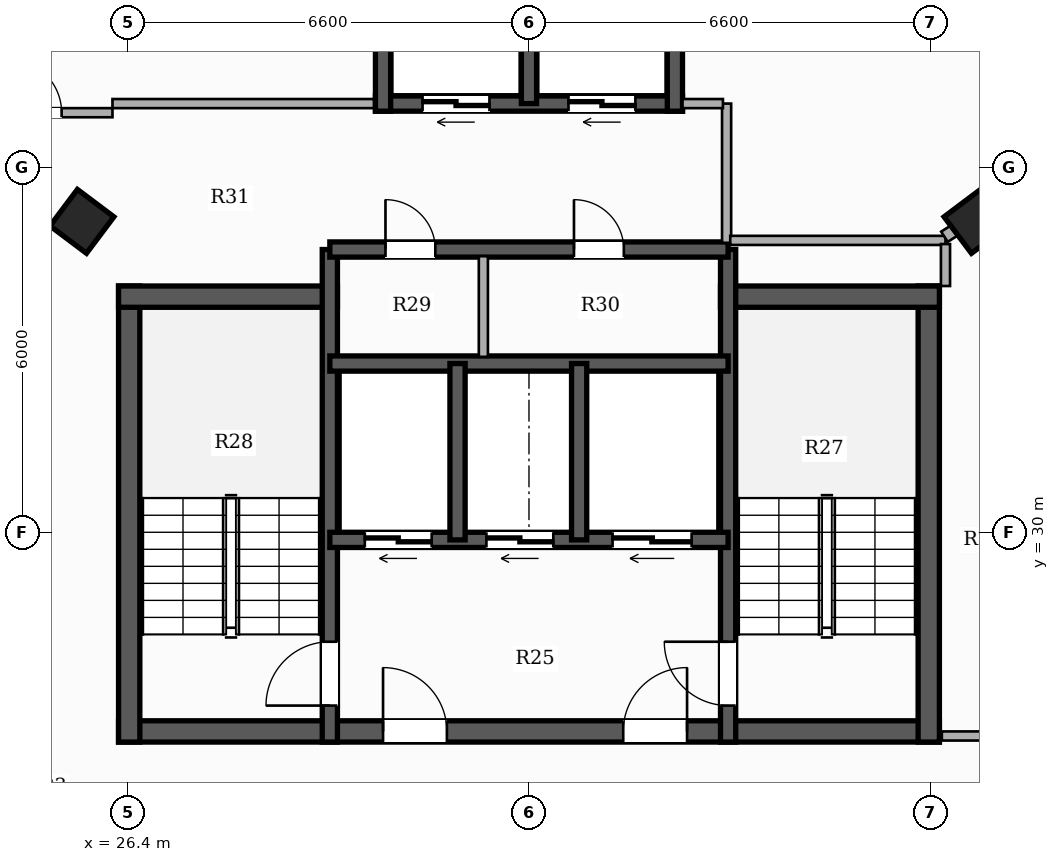
"""IFC4 building model, lengths in metres.
Left out: names, types, materials, properties, quantities, classifications, styles, units other than length and angle.
Written with IfcOpenShell. Run it as: python <this file> out.ifc"""

import sys

from ifc_helpers import new_model, si_unit, direction, frame, frame_2d, origin, origin_2d, place, context, subcontext, project, spatial, rectangle, hollow_rectangle, extrude, element, fill, save


model = new_model("IFC4")
c1 = context("Model", 3, precision=1e-05, world=origin(), true_north=direction((0.0, 1.0)))
c2 = subcontext(c1, "Body", "Model", "MODEL_VIEW")
j1 = project(units=[si_unit("LENGTHUNIT", "METRE"), si_unit("PLANEANGLEUNIT", "RADIAN")], contexts=[c1])
p1 = place(None, origin())
s1 = spatial("IfcSite", under=j1, at=p1, CompositionType="ELEMENT")
p2 = place(p1, origin())
s2 = spatial("IfcBuilding", under=s1, at=p2, CompositionType="ELEMENT")
p3 = place(p2, frame((0.0, 0.0, 206.3)))
s3 = spatial("IfcBuildingStorey", under=s2, at=p3, CompositionType="ELEMENT", Elevation=206.3)
p4 = place(p3, frame((26.25, 26.725, 0.0), z_axis=(0.0, 0.0, 1.0), x_axis=(1.0, 0.0, 0.0)))
e1 = element("IfcWall", 1, at=p4, inside=s3, PredefinedType="SHEAR", context=c2, shape_type="SweptSolid", body=[
    extrude(rectangle(XDim=13.5, YDim=0.35, at=frame_2d((6.75, 0.0))), origin(), (0.0, 0.0, 1.0), 3.3),
])
p5 = place(p4, frame((4.35, 0.0, 0.0)))
e2 = element("IfcOpeningElement", 2, at=p5, cuts=e1, PredefinedType="OPENING", context=c2, shape_type="SweptSolid", body=[
    extrude(rectangle(XDim=1.05, YDim=2.15, at=frame_2d((0.525, 1.075))), frame((0.0, 0.185, 0.0), z_axis=(0.0, -1.0, 0.0), x_axis=(1.0, 0.0, 0.0)), (0.0, 0.0, 1.0), 0.37),
])
p6 = place(p4, frame((8.3, 0.0, 0.0)))
e3 = element("IfcOpeningElement", 3, at=p6, cuts=e1, PredefinedType="OPENING", context=c2, shape_type="SweptSolid", body=[
    extrude(rectangle(XDim=1.05, YDim=2.15, at=frame_2d((0.525, 1.075))), frame((0.0, 0.185, 0.0), z_axis=(0.0, -1.0, 0.0), x_axis=(1.0, 0.0, 0.0)), (0.0, 0.0, 1.0), 0.37),
])
p7 = place(p3, frame((26.425, 26.55, 0.0), z_axis=(0.0, 0.0, 1.0), x_axis=(0.0, 1.0, 0.0)))
e4 = element("IfcWall", 4, at=p7, inside=s3, PredefinedType="SHEAR", context=c2, shape_type="SweptSolid", body=[
    extrude(rectangle(XDim=7.5, YDim=0.35, at=frame_2d((3.75, 0.0))), origin(), (0.0, 0.0, 1.0), 3.3),
])
p8 = place(p3, frame((26.25, 33.875, 0.0), z_axis=(0.0, 0.0, 1.0), x_axis=(1.0, 0.0, 0.0)))
e5 = element("IfcWall", 5, at=p8, inside=s3, PredefinedType="SHEAR", context=c2, shape_type="SweptSolid", body=[
    extrude(rectangle(XDim=3.6, YDim=0.35, at=frame_2d((1.8, 0.0))), origin(), (0.0, 0.0, 1.0), 3.3),
])
p9 = place(p3, frame((39.575, 26.55, 0.0), z_axis=(0.0, 0.0, 1.0), x_axis=(0.0, 1.0, 0.0)))
e6 = element("IfcWall", 6, at=p9, inside=s3, PredefinedType="SHEAR", context=c2, shape_type="SweptSolid", body=[
    extrude(rectangle(XDim=7.5, YDim=0.35, at=frame_2d((3.75, 0.0))), origin(), (0.0, 0.0, 1.0), 3.3),
])
p10 = place(p3, frame((36.15, 33.875, 0.0), z_axis=(0.0, 0.0, 1.0), x_axis=(1.0, 0.0, 0.0)))
e7 = element("IfcWall", 7, at=p10, inside=s3, PredefinedType="SHEAR", context=c2, shape_type="SweptSolid", body=[
    extrude(rectangle(XDim=3.6, YDim=0.35, at=frame_2d((1.8, 0.0))), origin(), (0.0, 0.0, 1.0), 3.3),
])
p11 = place(p3, frame((29.725, 26.55, 0.0), z_axis=(0.0, 0.0, 1.0), x_axis=(0.0, 1.0, 0.0)))
e8 = element("IfcWall", 8, at=p11, inside=s3, PredefinedType="SHEAR", context=c2, shape_type="SweptSolid", body=[
    extrude(rectangle(XDim=8.1, YDim=0.25, at=frame_2d((4.05, 0.0))), origin(), (0.0, 0.0, 1.0), 3.3),
])
p12 = place(p11, frame((0.6, 0.0, 0.0)))
e9 = element("IfcOpeningElement", 9, at=p12, cuts=e8, PredefinedType="OPENING", context=c2, shape_type="SweptSolid", body=[
    extrude(rectangle(XDim=1.05, YDim=2.15, at=frame_2d((0.525, 1.075))), frame((0.0, 0.135, 0.0), z_axis=(0.0, -1.0, 0.0), x_axis=(1.0, 0.0, 0.0)), (0.0, 0.0, 1.0), 0.27),
])
p13 = place(p3, frame((36.275, 26.55, 0.0), z_axis=(0.0, 0.0, 1.0), x_axis=(0.0, 1.0, 0.0)))
e10 = element("IfcWall", 10, at=p13, inside=s3, PredefinedType="SHEAR", context=c2, shape_type="SweptSolid", body=[
    extrude(rectangle(XDim=8.1, YDim=0.25, at=frame_2d((4.05, 0.0))), origin(), (0.0, 0.0, 1.0), 3.3),
])
p14 = place(p13, frame((0.6, 0.0, 0.0)))
e11 = element("IfcOpeningElement", 11, at=p14, cuts=e10, PredefinedType="OPENING", context=c2, shape_type="SweptSolid", body=[
    extrude(rectangle(XDim=1.05, YDim=2.15, at=frame_2d((0.525, 1.075))), frame((0.0, 0.135, 0.0), z_axis=(0.0, -1.0, 0.0), x_axis=(1.0, 0.0, 0.0)), (0.0, 0.0, 1.0), 0.27),
])
p15 = place(p3, frame((36.275, 29.875, 0.0), z_axis=(0.0, 0.0, 1.0), x_axis=(-1.0, 0.0, 0.0)))
e12 = element("IfcWall", 12, at=p15, inside=s3, PredefinedType="SHEAR", context=c2, shape_type="SweptSolid", body=[
    extrude(rectangle(XDim=6.55, YDim=0.25, at=frame_2d((3.275, 0.0))), origin(), (0.0, 0.0, 1.0), 3.3),
])
p16 = place(p15, frame((4.875, 0.0, 0.0)))
e13 = element("IfcOpeningElement", 13, at=p16, cuts=e12, PredefinedType="OPENING", context=c2, shape_type="SweptSolid", body=[
    extrude(rectangle(XDim=1.1, YDim=2.2, at=frame_2d((0.55, 1.1))), frame((0.0, 0.135, 0.0), z_axis=(0.0, -1.0, 0.0), x_axis=(1.0, 0.0, 0.0)), (0.0, 0.0, 1.0), 0.27),
])
p17 = place(p15, frame((2.875, 0.0, 0.0)))
e14 = element("IfcOpeningElement", 14, at=p17, cuts=e12, PredefinedType="OPENING", context=c2, shape_type="SweptSolid", body=[
    extrude(rectangle(XDim=1.1, YDim=2.2, at=frame_2d((0.55, 1.1))), frame((0.0, 0.135, 0.0), z_axis=(0.0, -1.0, 0.0), x_axis=(1.0, 0.0, 0.0)), (0.0, 0.0, 1.0), 0.27),
])
p18 = place(p15, frame((0.6, 0.0, 0.0)))
e15 = element("IfcOpeningElement", 15, at=p18, cuts=e12, PredefinedType="OPENING", context=c2, shape_type="SweptSolid", body=[
    extrude(rectangle(XDim=1.3, YDim=2.2, at=frame_2d((0.65, 1.1))), frame((0.0, 0.135, 0.0), z_axis=(0.0, -1.0, 0.0), x_axis=(1.0, 0.0, 0.0)), (0.0, 0.0, 1.0), 0.27),
])
p19 = place(p3, frame((29.725, 32.775, 0.0), z_axis=(0.0, 0.0, 1.0), x_axis=(1.0, 0.0, 0.0)))
e16 = element("IfcWall", 16, at=p19, inside=s3, PredefinedType="SHEAR", context=c2, shape_type="SweptSolid", body=[
    extrude(rectangle(XDim=6.55, YDim=0.25, at=frame_2d((3.275, 0.0))), origin(), (0.0, 0.0, 1.0), 3.3),
])
for number, where, z_axis, x_axis in (
    (17, (31.825, 29.875, 0.0), (0.0, 0.0, 1.0), (0.0, 1.0, 0.0)),
    (18, (33.825, 29.875, 0.0), (0.0, 0.0, 1.0), (0.0, 1.0, 0.0)),
):
    element("IfcWall", number, at=place(p3, frame(where, z_axis=z_axis, x_axis=x_axis)), inside=s3, PredefinedType="SHEAR", context=c2, shape_type="SweptSolid", body=[
        extrude(rectangle(XDim=2.9, YDim=0.25, at=frame_2d((1.45, 0.0))), origin(), (0.0, 0.0, 1.0), 3.3),
    ])
p20 = place(p3, frame((29.725, 34.65, 0.0), z_axis=(0.0, 0.0, 1.0), x_axis=(1.0, 0.0, 0.0)))
e19 = element("IfcWall", 19, at=p20, inside=s3, PredefinedType="SHEAR", context=c2, shape_type="SweptSolid", body=[
    extrude(rectangle(XDim=6.55, YDim=0.25, at=frame_2d((3.275, 0.0))), origin(), (0.0, 0.0, 1.0), 3.3),
])
p21 = place(p20, frame((0.915, 0.0, 0.0)))
e20 = element("IfcOpeningElement", 20, at=p21, cuts=e19, PredefinedType="OPENING", context=c2, shape_type="SweptSolid", body=[
    extrude(rectangle(XDim=0.82, YDim=2.1, at=frame_2d((0.41, 1.05))), frame((0.0, 0.135, 0.0), z_axis=(0.0, -1.0, 0.0), x_axis=(1.0, 0.0, 0.0)), (0.0, 0.0, 1.0), 0.27),
])
p22 = place(p20, frame((4.015, 0.0, 0.0)))
e21 = element("IfcOpeningElement", 21, at=p22, cuts=e19, PredefinedType="OPENING", context=c2, shape_type="SweptSolid", body=[
    extrude(rectangle(XDim=0.82, YDim=2.1, at=frame_2d((0.41, 1.05))), frame((0.0, 0.135, 0.0), z_axis=(0.0, -1.0, 0.0), x_axis=(1.0, 0.0, 0.0)), (0.0, 0.0, 1.0), 0.27),
])
p23 = place(p3, frame((35.525, 37.05, 0.0), z_axis=(0.0, 0.0, 1.0), x_axis=(-1.0, 0.0, 0.0)))
e22 = element("IfcWall", 22, at=p23, inside=s3, PredefinedType="SHEAR", context=c2, shape_type="SweptSolid", body=[
    extrude(rectangle(XDim=5.05, YDim=0.25, at=frame_2d((2.525, 0.0))), origin(), (0.0, 0.0, 1.0), 3.3),
])
p24 = place(p23, frame((3.175, 0.0, 0.0)))
e23 = element("IfcOpeningElement", 23, at=p24, cuts=e22, PredefinedType="OPENING", context=c2, shape_type="SweptSolid", body=[
    extrude(rectangle(XDim=1.1, YDim=2.2, at=frame_2d((0.55, 1.1))), frame((0.0, 0.135, 0.0), z_axis=(0.0, -1.0, 0.0), x_axis=(1.0, 0.0, 0.0)), (0.0, 0.0, 1.0), 0.27),
])
p25 = place(p23, frame((0.775, 0.0, 0.0)))
e24 = element("IfcOpeningElement", 24, at=p25, cuts=e22, PredefinedType="OPENING", context=c2, shape_type="SweptSolid", body=[
    extrude(rectangle(XDim=1.1, YDim=2.2, at=frame_2d((0.55, 1.1))), frame((0.0, 0.135, 0.0), z_axis=(0.0, -1.0, 0.0), x_axis=(1.0, 0.0, 0.0)), (0.0, 0.0, 1.0), 0.27),
])
for number, where, z_axis, x_axis in (
    (25, (30.6, 36.925, 0.0), (0.0, 0.0, 1.0), (0.0, 1.0, 0.0)),
    (26, (35.4, 36.925, 0.0), (0.0, 0.0, 1.0), (0.0, 1.0, 0.0)),
):
    element("IfcWall", number, at=place(p3, frame(where, z_axis=z_axis, x_axis=x_axis)), inside=s3, PredefinedType="SHEAR", context=c2, shape_type="SweptSolid", body=[
        extrude(rectangle(XDim=2.8, YDim=0.25, at=frame_2d((1.4, 0.0))), origin(), (0.0, 0.0, 1.0), 3.3),
    ])
p26 = place(p3, frame((33.0, 37.05, 0.0), z_axis=(0.0, 0.0, 1.0), x_axis=(0.0, 1.0, 0.0)))
e27 = element("IfcWall", 27, at=p26, inside=s3, PredefinedType="SHEAR", context=c2, shape_type="SweptSolid", body=[
    extrude(rectangle(XDim=2.55, YDim=0.25, at=frame_2d((1.275, 0.0))), origin(), (0.0, 0.0, 1.0), 3.3),
])
for number, where, z_axis, x_axis in (
    (28, (25.648, 35.113, 0.0), (0.0, 0.0, 1.0), (0.6, 0.8, 0.0)),
    (29, (40.352, 35.113, 0.0), (0.0, 0.0, 1.0), (-0.6, 0.8, 0.0)),
):
    element("IfcColumn", number, at=place(p3, frame(where, z_axis=z_axis, x_axis=x_axis)), inside=s3, PredefinedType="COLUMN", context=c2, shape_type="SweptSolid", body=[
        extrude(hollow_rectangle(XDim=0.75, YDim=0.75, WallThickness=0.025, at=origin_2d()), origin(), (0.0, 0.0, 1.0), 3.3),
    ])
p27 = place(p3, frame((36.25, 34.76, 0.0), z_axis=(0.0, 0.0, 1.0), x_axis=(0.0, 1.0, 0.0)))
e30 = element("IfcWall", 30, at=p27, inside=s3, PredefinedType="PARTITIONING", context=c2, shape_type="SweptSolid", body=[
    extrude(rectangle(XDim=2.29, YDim=0.15, at=frame_2d((1.145, 0.0))), origin(), (0.0, 0.0, 1.0), 2.425),
])
p28 = place(p3, frame((35.525, 37.05, 0.0), z_axis=(0.0, 0.0, 1.0), x_axis=(1.0, 0.0, 0.0)))
e31 = element("IfcWall", 31, at=p28, inside=s3, PredefinedType="PARTITIONING", context=c2, shape_type="SweptSolid", body=[
    extrude(rectangle(XDim=0.665, YDim=0.15, at=frame_2d((0.333, 0.0))), origin(), (0.0, 0.0, 1.0), 2.425),
])
p29 = place(p3, frame((32.25, 32.885, 0.0), z_axis=(0.0, 0.0, 1.0), x_axis=(0.0, 1.0, 0.0)))
e32 = element("IfcWall", 32, at=p29, inside=s3, PredefinedType="PARTITIONING", context=c2, shape_type="SweptSolid", body=[
    extrude(rectangle(XDim=1.655, YDim=0.15, at=frame_2d((0.828, 0.0))), origin(), (0.0, 0.0, 1.0), 3.06),
])
p30 = place(p3, frame((24.028, 36.9, 0.0), z_axis=(0.0, 0.0, 1.0), x_axis=(1.0, 0.0, 0.0)))
e33 = element("IfcWall", 33, at=p30, inside=s3, PredefinedType="PARTITIONING", context=c2, shape_type="SweptSolid", body=[
    extrude(rectangle(XDim=2.122, YDim=0.15, at=frame_2d((1.061, 0.0))), origin(), (0.0, 0.0, 1.0), 2.619),
])
p31 = place(p30, frame((0.406, 0.0, 0.0)))
e34 = element("IfcOpeningElement", 34, at=p31, cuts=e33, PredefinedType="OPENING", context=c2, shape_type="SweptSolid", body=[
    extrude(rectangle(XDim=0.88, YDim=2.1, at=frame_2d((0.44, 1.05))), frame((0.0, 0.085, 0.0), z_axis=(0.0, -1.0, 0.0), x_axis=(1.0, 0.0, 0.0)), (0.0, 0.0, 1.0), 0.17),
])
p32 = place(p3, frame((39.79, 26.65, 0.0), z_axis=(0.0, 0.0, 1.0), x_axis=(1.0, 0.0, 0.0)))
e35 = element("IfcWall", 35, at=p32, inside=s3, PredefinedType="PARTITIONING", context=c2, shape_type="SweptSolid", body=[
    extrude(rectangle(XDim=2.46, YDim=0.15, at=frame_2d((1.23, 0.0))), origin(), (0.0, 0.0, 1.0), 2.565),
])
p33 = place(p32, frame((0.79, 0.0, 0.0)))
e36 = element("IfcOpeningElement", 36, at=p33, cuts=e35, PredefinedType="OPENING", context=c2, shape_type="SweptSolid", body=[
    extrude(rectangle(XDim=0.88, YDim=2.1, at=frame_2d((0.44, 1.05))), frame((0.0, 0.085, 0.0), z_axis=(0.0, -1.0, 0.0), x_axis=(1.0, 0.0, 0.0)), (0.0, 0.0, 1.0), 0.17),
])
p34 = place(p3, frame((26.15, 37.05, 0.0), z_axis=(0.0, 0.0, 1.0), x_axis=(1.0, 0.0, 0.0)))
e37 = element("IfcWall", 37, at=p34, inside=s3, PredefinedType="PARTITIONING", context=c2, shape_type="SweptSolid", body=[
    extrude(rectangle(XDim=4.3, YDim=0.15, at=frame_2d((2.15, 0.0))), origin(), (0.0, 0.0, 1.0), 2.425),
])
p35 = place(p3, frame((36.31, 34.8, 0.0), z_axis=(0.0, 0.0, 1.0), x_axis=(1.0, 0.0, 0.0)))
e38 = element("IfcWall", 38, at=p35, inside=s3, PredefinedType="PARTITIONING", context=c2, shape_type="SweptSolid", body=[
    extrude(rectangle(XDim=3.54, YDim=0.15, at=frame_2d((1.77, 0.0))), origin(), (0.0, 0.0, 1.0), 2.425),
])
p36 = place(p3, frame((39.85, 34.74, 0.0), z_axis=(0.0, 0.0, 1.0), x_axis=(0.0, -1.0, 0.0)))
e39 = element("IfcWall", 39, at=p36, inside=s3, PredefinedType="PARTITIONING", context=c2, shape_type="SweptSolid", body=[
    extrude(rectangle(XDim=0.69, YDim=0.15, at=frame_2d((0.345, 0.0))), origin(), (0.0, 0.0, 1.0), 2.773),
])
p37 = place(p3, frame((39.833, 34.86, 0.0), z_axis=(0.0, 0.0, 1.0), x_axis=(0.842993506682, 0.537923737803, 0.0)))
e40 = element("IfcWall", 40, at=p37, inside=s3, PredefinedType="PARTITIONING", context=c2, shape_type="SweptSolid", body=[
    extrude(rectangle(XDim=2.907, YDim=0.2, at=frame_2d((1.454, 0.0))), origin(), (0.0, 0.0, 1.0), 2.492),
])
p38 = place(p12, origin())
e41 = element("IfcDoor", 41, at=p38, inside=s3, OperationType="SINGLE_SWING_LEFT", PredefinedType="DOOR", context=c2, shape_type="SweptSolid", body=[
    extrude(rectangle(XDim=1.05, YDim=2.15, at=frame_2d((0.525, 1.075))), frame((0.0, 0.025, 0.0), z_axis=(0.0, -1.0, 0.0), x_axis=(1.0, 0.0, 0.0)), (0.0, 0.0, 1.0), 0.05),
])
fill(e9, e41)
p39 = place(p14, origin())
e42 = element("IfcDoor", 42, at=p39, inside=s3, OperationType="SINGLE_SWING_RIGHT", PredefinedType="DOOR", context=c2, shape_type="SweptSolid", body=[
    extrude(rectangle(XDim=1.05, YDim=2.15, at=frame_2d((0.525, 1.075))), frame((0.0, 0.025, 0.0), z_axis=(0.0, -1.0, 0.0), x_axis=(1.0, 0.0, 0.0)), (0.0, 0.0, 1.0), 0.05),
])
fill(e11, e42)
p40 = place(p5, origin())
e43 = element("IfcDoor", 43, at=p40, inside=s3, OperationType="SINGLE_SWING_LEFT", PredefinedType="DOOR", context=c2, shape_type="SweptSolid", body=[
    extrude(rectangle(XDim=1.05, YDim=2.15, at=frame_2d((0.525, 1.075))), frame((0.0, 0.025, 0.0), z_axis=(0.0, -1.0, 0.0), x_axis=(1.0, 0.0, 0.0)), (0.0, 0.0, 1.0), 0.05),
])
fill(e2, e43)
p41 = place(p6, origin())
e44 = element("IfcDoor", 44, at=p41, inside=s3, OperationType="SINGLE_SWING_RIGHT", PredefinedType="DOOR", context=c2, shape_type="SweptSolid", body=[
    extrude(rectangle(XDim=1.05, YDim=2.15, at=frame_2d((0.525, 1.075))), frame((0.0, 0.025, 0.0), z_axis=(0.0, -1.0, 0.0), x_axis=(1.0, 0.0, 0.0)), (0.0, 0.0, 1.0), 0.05),
])
fill(e3, e44)
p42 = place(p16, origin())
e45 = element("IfcDoor", 45, at=p42, inside=s3, OperationType="DOUBLE_DOOR_SLIDING", PredefinedType="DOOR", context=c2, shape_type="SweptSolid", body=[
    extrude(rectangle(XDim=1.1, YDim=2.2, at=frame_2d((0.55, 1.1))), frame((0.0, 0.025, 0.0), z_axis=(0.0, -1.0, 0.0), x_axis=(1.0, 0.0, 0.0)), (0.0, 0.0, 1.0), 0.05),
])
fill(e13, e45)
p43 = place(p17, origin())
e46 = element("IfcDoor", 46, at=p43, inside=s3, OperationType="DOUBLE_DOOR_SLIDING", PredefinedType="DOOR", context=c2, shape_type="SweptSolid", body=[
    extrude(rectangle(XDim=1.1, YDim=2.2, at=frame_2d((0.55, 1.1))), frame((0.0, 0.025, 0.0), z_axis=(0.0, -1.0, 0.0), x_axis=(1.0, 0.0, 0.0)), (0.0, 0.0, 1.0), 0.05),
])
fill(e14, e46)
p44 = place(p18, origin())
e47 = element("IfcDoor", 47, at=p44, inside=s3, OperationType="DOUBLE_DOOR_SLIDING", PredefinedType="DOOR", context=c2, shape_type="SweptSolid", body=[
    extrude(rectangle(XDim=1.3, YDim=2.2, at=frame_2d((0.65, 1.1))), frame((0.0, 0.025, 0.0), z_axis=(0.0, -1.0, 0.0), x_axis=(1.0, 0.0, 0.0)), (0.0, 0.0, 1.0), 0.05),
])
fill(e15, e47)
p45 = place(p24, origin())
e48 = element("IfcDoor", 48, at=p45, inside=s3, OperationType="DOUBLE_DOOR_SLIDING", PredefinedType="DOOR", context=c2, shape_type="SweptSolid", body=[
    extrude(rectangle(XDim=1.1, YDim=2.2, at=frame_2d((0.55, 1.1))), frame((0.0, 0.025, 0.0), z_axis=(0.0, -1.0, 0.0), x_axis=(1.0, 0.0, 0.0)), (0.0, 0.0, 1.0), 0.05),
])
fill(e23, e48)
p46 = place(p25, origin())
e49 = element("IfcDoor", 49, at=p46, inside=s3, OperationType="DOUBLE_DOOR_SLIDING", PredefinedType="DOOR", context=c2, shape_type="SweptSolid", body=[
    extrude(rectangle(XDim=1.1, YDim=2.2, at=frame_2d((0.55, 1.1))), frame((0.0, 0.025, 0.0), z_axis=(0.0, -1.0, 0.0), x_axis=(1.0, 0.0, 0.0)), (0.0, 0.0, 1.0), 0.05),
])
fill(e24, e49)
p47 = place(p21, origin())
e50 = element("IfcDoor", 50, at=p47, inside=s3, OperationType="SINGLE_SWING_LEFT", PredefinedType="DOOR", context=c2, shape_type="SweptSolid", body=[
    extrude(rectangle(XDim=0.82, YDim=2.1, at=frame_2d((0.41, 1.05))), frame((0.0, 0.025, 0.0), z_axis=(0.0, -1.0, 0.0), x_axis=(1.0, 0.0, 0.0)), (0.0, 0.0, 1.0), 0.05),
])
fill(e20, e50)
p48 = place(p22, origin())
e51 = element("IfcDoor", 51, at=p48, inside=s3, OperationType="SINGLE_SWING_LEFT", PredefinedType="DOOR", context=c2, shape_type="SweptSolid", body=[
    extrude(rectangle(XDim=0.82, YDim=2.1, at=frame_2d((0.41, 1.05))), frame((0.0, 0.025, 0.0), z_axis=(0.0, -1.0, 0.0), x_axis=(1.0, 0.0, 0.0)), (0.0, 0.0, 1.0), 0.05),
])
fill(e21, e51)
p49 = place(p31, origin())
e52 = element("IfcDoor", 52, at=p49, inside=s3, OperationType="SINGLE_SWING_LEFT", PredefinedType="DOOR", context=c2, shape_type="SweptSolid", body=[
    extrude(rectangle(XDim=0.88, YDim=2.1, at=frame_2d((0.44, 1.05))), frame((0.0, 0.025, 0.0), z_axis=(0.0, -1.0, 0.0), x_axis=(1.0, 0.0, 0.0)), (0.0, 0.0, 1.0), 0.05),
])
fill(e34, e52)
save(model, sys.argv[1])
